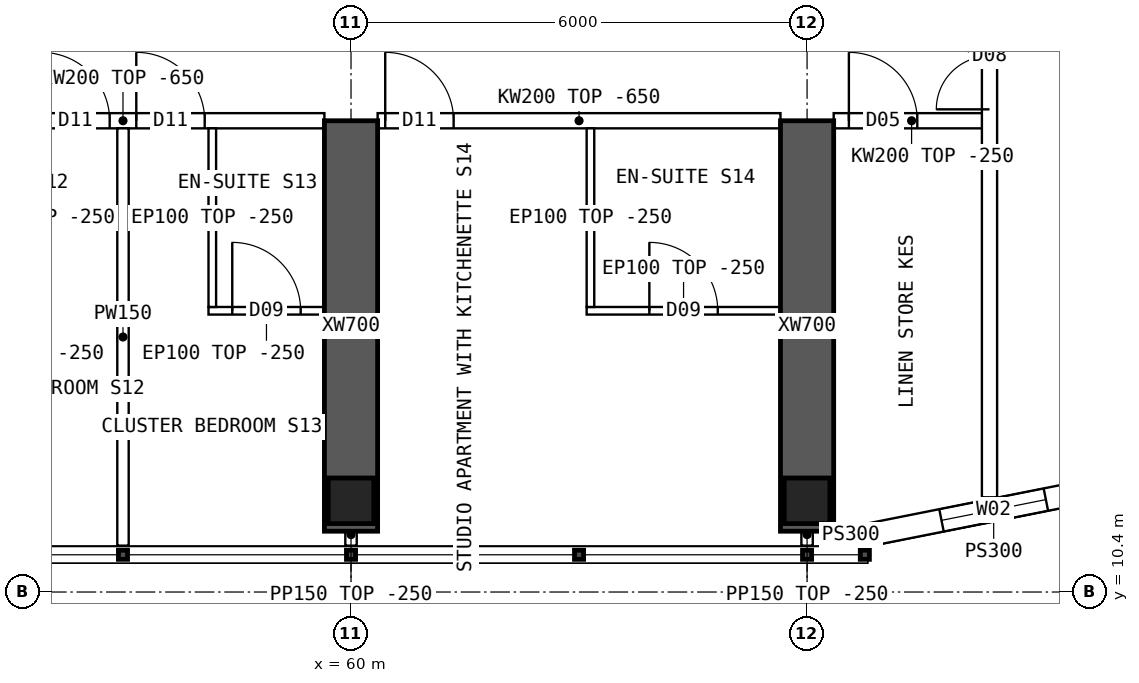
"""IFC4 building model, lengths in metres.
Left out: names, types, materials, properties, quantities, classifications, styles, units other than length and angle.
Written with IfcOpenShell. Run it as: python <this file> out.ifc"""

import sys

from ifc_helpers import new_model, si_unit, direction, frame, frame_2d, origin, origin_2d, place, context, subcontext, project, spatial, polyline, rectangle, hollow_rectangle, outline, extrude, element, fill, save


model = new_model("IFC4")
c1 = context("Model", 3, precision=1e-05, world=origin(), true_north=direction((0.0, 1.0)))
c2 = subcontext(c1, "Body", "Model", "MODEL_VIEW")
j1 = project(units=[si_unit("LENGTHUNIT", "METRE"), si_unit("PLANEANGLEUNIT", "RADIAN")], contexts=[c1])
p1 = place(None, origin())
s1 = spatial("IfcSite", under=j1, at=p1, CompositionType="ELEMENT")
p2 = place(p1, origin())
s2 = spatial("IfcBuilding", under=s1, at=p2, CompositionType="ELEMENT")
p3 = place(p2, frame((0.0, 0.0, 220.3)))
s3 = spatial("IfcBuildingStorey", under=s2, at=p3, CompositionType="ELEMENT", Elevation=220.3)
for number, where, z_axis, x_axis in (
    (1, (60.0, 11.6, 0.0), (0.0, 0.0, 1.0), (1.0, 0.0, 0.0)),
    (2, (66.0, 11.6, 0.0), (0.0, 0.0, 1.0), (1.0, 0.0, 0.0)),
):
    element("IfcColumn", number, at=place(p3, frame(where, z_axis=z_axis, x_axis=x_axis)), inside=s3, PredefinedType="COLUMN", context=c2, shape_type="SweptSolid", body=[
        extrude(hollow_rectangle(XDim=0.6, YDim=0.6, WallThickness=0.06, at=origin_2d()), origin(), (0.0, 0.0, 1.0), 3.75),
    ])
for number, where, z_axis, x_axis in (
    (3, (60.0, 11.2, 0.0), (0.0, 0.0, 1.0), (0.0, 1.0, 0.0)),
    (4, (66.0, 11.2, 0.0), (0.0, 0.0, 1.0), (0.0, 1.0, 0.0)),
):
    element("IfcWall", number, at=place(p3, frame(where, z_axis=z_axis, x_axis=x_axis)), inside=s3, PredefinedType="SHEAR", context=c2, shape_type="SweptSolid", body=[
        extrude(rectangle(XDim=5.4, YDim=0.7, at=frame_2d((2.7, 0.0))), origin(), (0.0, 0.0, 1.0), 3.75),
    ])
p4 = place(p3, frame((66.8, 11.15, 0.0), z_axis=(0.0, 0.0, 1.0), x_axis=(0.98078325777, 0.195100490205, 0.0)))
e5 = element("IfcWall", 5, at=p4, inside=s3, PredefinedType="SOLIDWALL", context=c2, shape_type="SweptSolid", body=[
    extrude(outline(polyline([(-0.03, -0.15), (3.405, -0.15), (3.345, 0.15), (0.03, 0.15), (-0.03, -0.15)])), origin(), (0.0, 0.0, 1.0), 3.5),
])
p5 = place(p4, frame((0.988, 0.0, 0.9)))
e6 = element("IfcOpeningElement", 6, at=p5, cuts=e5, PredefinedType="OPENING", context=c2, shape_type="SweptSolid", body=[
    extrude(rectangle(XDim=1.4, YDim=1.8, at=frame_2d((0.7, 0.9))), frame((0.0, 0.16, 0.0), z_axis=(0.0, -1.0, 0.0), x_axis=(1.0, 0.0, 0.0)), (0.0, 0.0, 1.0), 0.32),
])
p6 = place(p3, frame((66.8, 11.15, 0.0), z_axis=(0.0, 0.0, 1.0), x_axis=(-1.0, 0.0, 0.0)))
e7 = element("IfcWall", 7, at=p6, inside=s3, PredefinedType="SOLIDWALL", context=c2, shape_type="SweptSolid", body=[
    extrude(rectangle(XDim=0.45, YDim=0.3, at=frame_2d((0.225, 0.0))), origin(), (0.0, 0.0, 1.0), 3.5),
])
p7 = place(p3, frame((54.35, 16.6, 0.0), z_axis=(0.0, 0.0, 1.0), x_axis=(1.0, 0.0, 0.0)))
e8 = element("IfcWall", 8, at=p7, inside=s3, PredefinedType="SOLIDWALL", context=c2, shape_type="SweptSolid", body=[
    extrude(outline(polyline([(0.0, 0.0), (5.3, 0.0), (5.3, 3.1), (0.0, 3.1), (0.0, 0.0)])), frame((0.0, 0.1, 0.0), z_axis=(0.0, -1.0, 0.0), x_axis=(1.0, 0.0, 0.0)), (0.0, 0.0, 1.0), 0.2),
])
p8 = place(p7, frame((1.575, 0.0, 0.0)))
e9 = element("IfcOpeningElement", 9, at=p8, cuts=e8, PredefinedType="OPENING", context=c2, shape_type="SweptSolid", body=[
    extrude(rectangle(XDim=0.9, YDim=2.1, at=frame_2d((0.45, 1.05))), frame((0.0, 0.11, 0.0), z_axis=(0.0, -1.0, 0.0), x_axis=(1.0, 0.0, 0.0)), (0.0, 0.0, 1.0), 0.22),
])
p9 = place(p7, frame((2.825, 0.0, 0.0)))
e10 = element("IfcOpeningElement", 10, at=p9, cuts=e8, PredefinedType="OPENING", context=c2, shape_type="SweptSolid", body=[
    extrude(rectangle(XDim=0.9, YDim=2.1, at=frame_2d((0.45, 1.05))), frame((0.0, 0.11, 0.0), z_axis=(0.0, -1.0, 0.0), x_axis=(1.0, 0.0, 0.0)), (0.0, 0.0, 1.0), 0.22),
])
p10 = place(p3, frame((60.35, 16.6, 0.0), z_axis=(0.0, 0.0, 1.0), x_axis=(1.0, 0.0, 0.0)))
e11 = element("IfcWall", 11, at=p10, inside=s3, PredefinedType="SOLIDWALL", context=c2, shape_type="SweptSolid", body=[
    extrude(outline(polyline([(0.0, 0.0), (5.3, 0.0), (5.3, 3.1), (0.0, 3.1), (0.0, 0.0)])), frame((0.0, 0.1, 0.0), z_axis=(0.0, -1.0, 0.0), x_axis=(1.0, 0.0, 0.0)), (0.0, 0.0, 1.0), 0.2),
])
p11 = place(p10, frame((0.1, 0.0, 0.0)))
e12 = element("IfcOpeningElement", 12, at=p11, cuts=e11, PredefinedType="OPENING", context=c2, shape_type="SweptSolid", body=[
    extrude(rectangle(XDim=0.9, YDim=2.1, at=frame_2d((0.45, 1.05))), frame((0.0, 0.11, 0.0), z_axis=(0.0, -1.0, 0.0), x_axis=(1.0, 0.0, 0.0)), (0.0, 0.0, 1.0), 0.22),
])
p12 = place(p3, frame((66.35, 16.6, 0.0), z_axis=(0.0, 0.0, 1.0), x_axis=(1.0, 0.0, 0.0)))
e13 = element("IfcWall", 13, at=p12, inside=s3, PredefinedType="SOLIDWALL", context=c2, shape_type="SweptSolid", body=[
    extrude(rectangle(XDim=2.05, YDim=0.2, at=frame_2d((1.025, 0.0))), origin(), (0.0, 0.0, 1.0), 3.5),
])
p13 = place(p12, frame((0.2, 0.0, 0.0)))
e14 = element("IfcOpeningElement", 14, at=p13, cuts=e13, PredefinedType="OPENING", context=c2, shape_type="SweptSolid", body=[
    extrude(rectangle(XDim=0.9, YDim=2.1, at=frame_2d((0.45, 1.05))), frame((0.0, 0.11, 0.0), z_axis=(0.0, -1.0, 0.0), x_axis=(1.0, 0.0, 0.0)), (0.0, 0.0, 1.0), 0.22),
])
p14 = place(p3, frame((57.0, 11.01, 0.0), z_axis=(0.0, 0.0, 1.0), x_axis=(0.0, 1.0, 0.0)))
e15 = element("IfcWall", 15, at=p14, inside=s3, PredefinedType="PARTITIONING", context=c2, shape_type="SweptSolid", body=[
    extrude(outline(polyline([(0.0, 0.0), (5.49, 0.0), (5.49, 3.1), (5.442, 3.1), (5.44, 3.5), (0.792, 3.5), (0.79, 3.1), (0.392, 3.1), (0.39, 3.5), (0.0, 3.5), (0.0, 0.0)])), frame((0.0, 0.075, 0.0), z_axis=(0.0, -1.0, 0.0), x_axis=(1.0, 0.0, 0.0)), (0.0, 0.0, 1.0), 0.15),
])
p15 = place(p3, frame((59.65, 14.1, 0.0), z_axis=(0.0, 0.0, 1.0), x_axis=(-1.0, 0.0, 0.0)))
e16 = element("IfcWall", 16, at=p15, inside=s3, PredefinedType="PARTITIONING", context=c2, shape_type="SweptSolid", body=[
    extrude(rectangle(XDim=1.525, YDim=0.1, at=frame_2d((0.762, 0.0))), origin(), (0.0, 0.0, 1.0), 3.5),
])
p16 = place(p15, frame((0.312, 0.0, 0.0)))
e17 = element("IfcOpeningElement", 17, at=p16, cuts=e16, PredefinedType="OPENING", context=c2, shape_type="SweptSolid", body=[
    extrude(rectangle(XDim=0.9, YDim=2.1, at=frame_2d((0.45, 1.05))), frame((0.0, 0.06, 0.0), z_axis=(0.0, -1.0, 0.0), x_axis=(1.0, 0.0, 0.0)), (0.0, 0.0, 1.0), 0.12),
])
p17 = place(p3, frame((58.175, 14.15, 0.0), z_axis=(0.0, 0.0, 1.0), x_axis=(0.0, 1.0, 0.0)))
e18 = element("IfcWall", 18, at=p17, inside=s3, PredefinedType="PARTITIONING", context=c2, shape_type="SweptSolid", body=[
    extrude(outline(polyline([(0.0, 0.0), (2.35, 0.0), (2.35, 3.1), (2.302, 3.1), (2.3, 3.5), (0.0, 3.5), (0.0, 0.0)])), frame((0.0, 0.05, 0.0), z_axis=(0.0, -1.0, 0.0), x_axis=(1.0, 0.0, 0.0)), (0.0, 0.0, 1.0), 0.1),
])
p18 = place(p3, frame((65.65, 14.1, 0.0), z_axis=(0.0, 0.0, 1.0), x_axis=(-1.0, 0.0, 0.0)))
e19 = element("IfcWall", 19, at=p18, inside=s3, PredefinedType="PARTITIONING", context=c2, shape_type="SweptSolid", body=[
    extrude(rectangle(XDim=2.55, YDim=0.1, at=frame_2d((1.275, 0.0))), origin(), (0.0, 0.0, 1.0), 3.5),
])
p19 = place(p18, frame((0.825, 0.0, 0.0)))
e20 = element("IfcOpeningElement", 20, at=p19, cuts=e19, PredefinedType="OPENING", context=c2, shape_type="SweptSolid", body=[
    extrude(rectangle(XDim=0.9, YDim=2.1, at=frame_2d((0.45, 1.05))), frame((0.0, 0.06, 0.0), z_axis=(0.0, -1.0, 0.0), x_axis=(1.0, 0.0, 0.0)), (0.0, 0.0, 1.0), 0.12),
])
p20 = place(p3, frame((63.15, 14.15, 0.0), z_axis=(0.0, 0.0, 1.0), x_axis=(0.0, 1.0, 0.0)))
e21 = element("IfcWall", 21, at=p20, inside=s3, PredefinedType="PARTITIONING", context=c2, shape_type="SweptSolid", body=[
    extrude(outline(polyline([(0.0, 0.0), (2.35, 0.0), (2.35, 3.1), (2.302, 3.1), (2.3, 3.5), (0.0, 3.5), (0.0, 0.0)])), frame((0.0, 0.05, 0.0), z_axis=(0.0, -1.0, 0.0), x_axis=(1.0, 0.0, 0.0)), (0.0, 0.0, 1.0), 0.1),
])
p21 = place(p3, frame((68.4, 11.646, 0.0), z_axis=(0.0, 0.0, 1.0), x_axis=(0.0, 1.0, 0.0)))
e22 = element("IfcWall", 22, at=p21, inside=s3, PredefinedType="SOLIDWALL", context=c2, shape_type="SweptSolid", body=[
    extrude(rectangle(XDim=40.708, YDim=0.2, at=frame_2d((20.354, 0.0))), origin(), (0.0, 0.0, 1.0), 3.5),
])
p22 = place(p21, frame((13.434, 0.0, 0.0)))
e23 = element("IfcOpeningElement", 23, at=p22, cuts=e22, PredefinedType="OPENING", context=c2, shape_type="SweptSolid", body=[
    extrude(rectangle(XDim=1.2, YDim=2.1, at=frame_2d((0.6, 1.05))), frame((0.0, 0.11, 0.0), z_axis=(0.0, -1.0, 0.0), x_axis=(1.0, 0.0, 0.0)), (0.0, 0.0, 1.0), 0.22),
])
p23 = place(p21, frame((26.074, 0.0, 0.0)))
e24 = element("IfcOpeningElement", 24, at=p23, cuts=e22, PredefinedType="OPENING", context=c2, shape_type="SweptSolid", body=[
    extrude(rectangle(XDim=1.2, YDim=2.1, at=frame_2d((0.6, 1.05))), frame((0.0, 0.11, 0.0), z_axis=(0.0, -1.0, 0.0), x_axis=(1.0, 0.0, 0.0)), (0.0, 0.0, 1.0), 0.22),
])
p24 = place(p21, frame((5.104, 0.0, 0.0)))
e25 = element("IfcOpeningElement", 25, at=p24, cuts=e22, PredefinedType="OPENING", context=c2, shape_type="SweptSolid", body=[
    extrude(rectangle(XDim=1.4, YDim=2.1, at=frame_2d((0.7, 1.05))), frame((0.0, 0.11, 0.0), z_axis=(0.0, -1.0, 0.0), x_axis=(1.0, 0.0, 0.0)), (0.0, 0.0, 1.0), 0.22),
])
p25 = place(p21, frame((34.104, 0.0, 0.0)))
e26 = element("IfcOpeningElement", 26, at=p25, cuts=e22, PredefinedType="OPENING", context=c2, shape_type="SweptSolid", body=[
    extrude(rectangle(XDim=1.4, YDim=2.1, at=frame_2d((0.7, 1.05))), frame((0.0, 0.11, 0.0), z_axis=(0.0, -1.0, 0.0), x_axis=(1.0, 0.0, 0.0)), (0.0, 0.0, 1.0), 0.22),
])
for number, where, z_axis, x_axis in (
    (27, (60.0, 11.3, 0.0), (0.0, 0.0, 1.0), (0.0, -1.0, 0.0)),
    (28, (66.0, 11.3, 0.0), (0.0, 0.0, 1.0), (0.0, -1.0, 0.0)),
):
    element("IfcWall", number, at=place(p3, frame(where, z_axis=z_axis, x_axis=x_axis)), inside=s3, PredefinedType="PARTITIONING", context=c2, shape_type="SweptSolid", body=[
        extrude(rectangle(XDim=0.29, YDim=0.15, at=frame_2d((0.145, 0.0))), origin(), (0.0, 0.0, 1.0), 3.5),
    ])
p26 = place(p5, origin())
e29 = element("IfcWindow", 29, at=p26, inside=s3, PartitioningType="SINGLE_PANEL", PredefinedType="WINDOW", context=c2, shape_type="SweptSolid", body=[
    extrude(rectangle(XDim=1.4, YDim=1.8, at=frame_2d((0.7, 0.9))), frame((0.0, 0.03, 0.0), z_axis=(0.0, -1.0, 0.0), x_axis=(1.0, 0.0, 0.0)), (0.0, 0.0, 1.0), 0.06),
])
fill(e6, e29)
p27 = place(p8, origin())
e30 = element("IfcDoor", 30, at=p27, inside=s3, OperationType="SINGLE_SWING_LEFT", PredefinedType="DOOR", context=c2, shape_type="SweptSolid", body=[
    extrude(rectangle(XDim=0.9, YDim=2.1, at=frame_2d((0.45, 1.05))), frame((0.0, 0.025, 0.0), z_axis=(0.0, -1.0, 0.0), x_axis=(1.0, 0.0, 0.0)), (0.0, 0.0, 1.0), 0.05),
])
fill(e9, e30)
p28 = place(p16, origin())
e31 = element("IfcDoor", 31, at=p28, inside=s3, OperationType="SINGLE_SWING_RIGHT", PredefinedType="DOOR", context=c2, shape_type="SweptSolid", body=[
    extrude(rectangle(XDim=0.9, YDim=2.1, at=frame_2d((0.45, 1.05))), frame((0.0, 0.025, 0.0), z_axis=(0.0, -1.0, 0.0), x_axis=(1.0, 0.0, 0.0)), (0.0, 0.0, 1.0), 0.05),
])
fill(e17, e31)
p29 = place(p9, origin())
e32 = element("IfcDoor", 32, at=p29, inside=s3, OperationType="SINGLE_SWING_LEFT", PredefinedType="DOOR", context=c2, shape_type="SweptSolid", body=[
    extrude(rectangle(XDim=0.9, YDim=2.1, at=frame_2d((0.45, 1.05))), frame((0.0, 0.025, 0.0), z_axis=(0.0, -1.0, 0.0), x_axis=(1.0, 0.0, 0.0)), (0.0, 0.0, 1.0), 0.05),
])
fill(e10, e32)
p30 = place(p19, origin())
e33 = element("IfcDoor", 33, at=p30, inside=s3, OperationType="SINGLE_SWING_RIGHT", PredefinedType="DOOR", context=c2, shape_type="SweptSolid", body=[
    extrude(rectangle(XDim=0.9, YDim=2.1, at=frame_2d((0.45, 1.05))), frame((0.0, 0.025, 0.0), z_axis=(0.0, -1.0, 0.0), x_axis=(1.0, 0.0, 0.0)), (0.0, 0.0, 1.0), 0.05),
])
fill(e20, e33)
p31 = place(p11, origin())
e34 = element("IfcDoor", 34, at=p31, inside=s3, OperationType="SINGLE_SWING_LEFT", PredefinedType="DOOR", context=c2, shape_type="SweptSolid", body=[
    extrude(rectangle(XDim=0.9, YDim=2.1, at=frame_2d((0.45, 1.05))), frame((0.0, 0.025, 0.0), z_axis=(0.0, -1.0, 0.0), x_axis=(1.0, 0.0, 0.0)), (0.0, 0.0, 1.0), 0.05),
])
fill(e12, e34)
p32 = place(p24, origin())
e35 = element("IfcDoor", 35, at=p32, inside=s3, OperationType="DOUBLE_DOOR_SINGLE_SWING", PredefinedType="DOOR", context=c2, shape_type="SweptSolid", body=[
    extrude(rectangle(XDim=1.4, YDim=2.1, at=frame_2d((0.7, 1.05))), frame((0.0, 0.025, 0.0), z_axis=(0.0, -1.0, 0.0), x_axis=(1.0, 0.0, 0.0)), (0.0, 0.0, 1.0), 0.05),
])
fill(e25, e35)
p33 = place(p13, origin())
e36 = element("IfcDoor", 36, at=p33, inside=s3, OperationType="SINGLE_SWING_LEFT", PredefinedType="DOOR", context=c2, shape_type="SweptSolid", body=[
    extrude(rectangle(XDim=0.9, YDim=2.1, at=frame_2d((0.45, 1.05))), frame((0.0, 0.025, 0.0), z_axis=(0.0, -1.0, 0.0), x_axis=(1.0, 0.0, 0.0)), (0.0, 0.0, 1.0), 0.05),
])
fill(e14, e36)
save(model, sys.argv[1])
